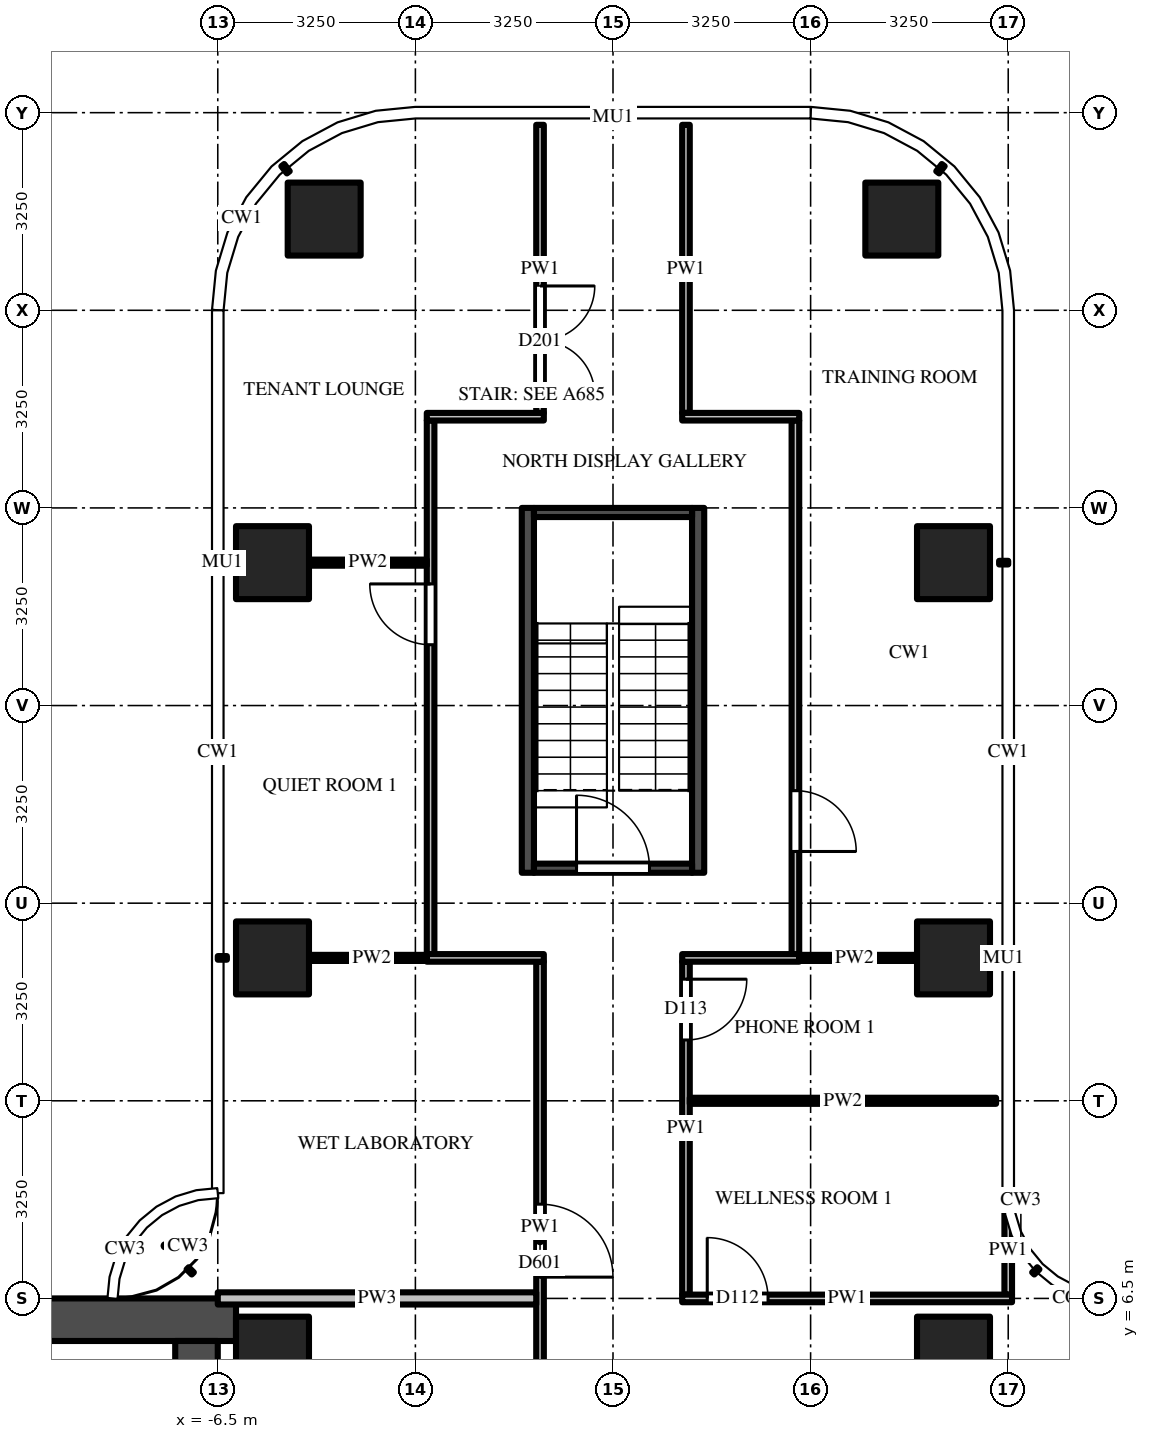
"""IFC4 building model, lengths in metres.
Left out: names, types, materials, properties, quantities, classifications, styles, units other than length and angle.
Written with IfcOpenShell. Run it as: python <this file> out.ifc"""

import sys

from ifc_helpers import new_model, si_unit, direction, frame, frame_2d, origin, origin_2d, place, context, subcontext, project, spatial, rectangle, extrude, source, transform, mapped, element, fill, save


model = new_model("IFC4")
c1 = context("Model", 3, precision=1e-05, world=origin(), true_north=direction((0.0, 1.0)))
c2 = subcontext(c1, "Body", "Model", "MODEL_VIEW")
j1 = project(units=[si_unit("LENGTHUNIT", "METRE"), si_unit("PLANEANGLEUNIT", "RADIAN")], contexts=[c1])
p1 = place(None, origin())
s1 = spatial("IfcSite", under=j1, at=p1, CompositionType="ELEMENT")
p2 = place(p1, origin())
s2 = spatial("IfcBuilding", under=s1, at=p2, CompositionType="ELEMENT")
p3 = place(p2, frame((0.0, 0.0, 177.6)))
s3 = spatial("IfcBuildingStorey", under=s2, at=p3, CompositionType="ELEMENT", Elevation=177.6)
m1 = source(origin(), c2, "Body", "SweptSolid", [
    extrude(rectangle(XDim=1.2, YDim=1.2, at=origin_2d()), origin(), (0.0, 0.0, 1.0), 3.9),
])
for number, where, z_axis, x_axis in (
    (1, (-5.6, 12.1, 0.0), (0.0, 0.0, 1.0), (1.0, 0.0, 0.0)),
    (2, (-5.6, 18.6, 0.0), (0.0, 0.0, 1.0), (1.0, 0.0, 0.0)),
    (3, (-4.75, 24.25, 0.0), (0.0, 0.0, 1.0), (1.0, 0.0, 0.0)),
    (4, (5.6, 12.1, 0.0), (0.0, 0.0, 1.0), (1.0, 0.0, 0.0)),
    (5, (5.6, 18.6, 0.0), (0.0, 0.0, 1.0), (1.0, 0.0, 0.0)),
    (6, (4.75, 24.25, 0.0), (0.0, 0.0, 1.0), (1.0, 0.0, 0.0)),
    (7, (5.6, 5.6, 0.0), (0.0, 0.0, 1.0), (1.0, 0.0, 0.0)),
    (8, (-5.6, 5.6, 0.0), (0.0, 0.0, 1.0), (1.0, 0.0, 0.0)),
):
    element("IfcColumn", number, at=place(p3, frame(where, z_axis=z_axis, x_axis=x_axis)), inside=s3, PredefinedType="COLUMN", context=c2, shape_type="MappedRepresentation", body=[
        mapped(m1, transform((0.0, 0.0, 0.0))),
    ])
m2 = source(origin(), c2, "Body", "SweptSolid", [
    extrude(rectangle(XDim=16.55, YDim=0.7, at=frame_2d((8.275, 0.0))), origin(), (0.0, 0.0, 1.0), 3.7),
])
p4 = place(p3, frame((-6.2, 6.15, 0.0), z_axis=(0.0, 0.0, 1.0), x_axis=(-1.0, 0.0, 0.0)))
e9 = element("IfcWall", 9, at=p4, inside=s3, PredefinedType="SHEAR", context=c2, shape_type="MappedRepresentation", body=[
    mapped(m2, transform((0.0, 0.0, 0.0))),
])
m3 = source(origin(), c2, "Body", "SweptSolid", [
    extrude(rectangle(XDim=9.05, YDim=0.7, at=frame_2d((4.525, 0.0))), origin(), (0.0, 0.0, 1.0), 3.7),
])
p5 = place(p3, frame((-6.85, 5.8, 0.0), z_axis=(0.0, 0.0, 1.0), x_axis=(0.0, -1.0, 0.0)))
e10 = element("IfcWall", 10, at=p5, inside=s3, PredefinedType="SHEAR", context=c2, shape_type="MappedRepresentation", body=[
    mapped(m3, transform((0.0, 0.0, 0.0))),
])
m4 = source(origin(), c2, "Body", "SweptSolid", [
    extrude(rectangle(XDim=1.8, YDim=2.1, at=frame_2d((0.9, 1.05))), frame((0.0, 0.36, 0.0), z_axis=(0.0, -1.0, 0.0), x_axis=(1.0, 0.0, 0.0)), (0.0, 0.0, 1.0), 0.72),
])
p6 = place(p5, frame((3.15, 0.0, 0.0)))
e11 = element("IfcOpeningElement", 11, at=p6, cuts=e10, PredefinedType="OPENING", context=c2, shape_type="MappedRepresentation", body=[
    mapped(m4, transform((0.0, 0.0, 0.0))),
])
m5 = source(origin(), c2, "Body", "SweptSolid", [
    extrude(rectangle(XDim=6.0, YDim=0.2, at=frame_2d((3.0, 0.0))), origin(), (0.0, 0.0, 1.0), 3.7),
])
for number, where, z_axis, x_axis in (
    (12, (-1.4, 13.5, 0.0), (0.0, 0.0, 1.0), (0.0, 1.0, 0.0)),
    (13, (1.4, 13.5, 0.0), (0.0, 0.0, 1.0), (0.0, 1.0, 0.0)),
):
    element("IfcWall", number, at=place(p3, frame(where, z_axis=z_axis, x_axis=x_axis)), inside=s3, PredefinedType="SHEAR", context=c2, shape_type="MappedRepresentation", body=[
        mapped(m5, transform((0.0, 0.0, 0.0))),
    ])
m6 = source(origin(), c2, "Body", "SweptSolid", [
    extrude(rectangle(XDim=2.6, YDim=0.15, at=frame_2d((1.3, 0.0))), origin(), (0.0, 0.0, 1.0), 3.7),
])
p7 = place(p3, frame((-1.3, 13.575, 0.0), z_axis=(0.0, 0.0, 1.0), x_axis=(1.0, 0.0, 0.0)))
e14 = element("IfcWall", 14, at=p7, inside=s3, PredefinedType="SHEAR", context=c2, shape_type="MappedRepresentation", body=[
    mapped(m6, transform((0.0, 0.0, 0.0))),
])
m7 = source(origin(), c2, "Body", "SweptSolid", [
    extrude(rectangle(XDim=1.2, YDim=2.1, at=frame_2d((0.6, 1.05))), frame((0.0, 0.085, 0.0), z_axis=(0.0, -1.0, 0.0), x_axis=(1.0, 0.0, 0.0)), (0.0, 0.0, 1.0), 0.17),
])
p8 = place(p7, frame((0.7, 0.0, 0.0)))
e15 = element("IfcOpeningElement", 15, at=p8, cuts=e14, PredefinedType="OPENING", context=c2, shape_type="MappedRepresentation", body=[
    mapped(m7, transform((0.0, 0.0, 0.0))),
])
p9 = place(p3, frame((-1.3, 19.425, 0.0), z_axis=(0.0, 0.0, 1.0), x_axis=(1.0, 0.0, 0.0)))
e16 = element("IfcWall", 16, at=p9, inside=s3, PredefinedType="SHEAR", context=c2, shape_type="MappedRepresentation", body=[
    mapped(m6, transform((0.0, 0.0, 0.0))),
])
m8 = source(origin(), c2, "Body", "SweptSolid", [
    extrude(rectangle(XDim=8.788, YDim=0.125, at=frame_2d((4.394, 0.0))), origin(), (0.0, 0.0, 1.0), 2.997),
])
p10 = place(p3, frame((-3.0, 12.15, 0.0), z_axis=(0.0, 0.0, 1.0), x_axis=(0.0, 1.0, 0.0)))
e17 = element("IfcWall", 17, at=p10, inside=s3, PredefinedType="PARTITIONING", context=c2, shape_type="MappedRepresentation", body=[
    mapped(m8, transform((0.0, 0.0, 0.0))),
])
m9 = source(origin(), c2, "Body", "SweptSolid", [
    extrude(rectangle(XDim=1.0, YDim=2.1, at=frame_2d((0.5, 1.05))), frame((0.0, 0.073, 0.0), z_axis=(0.0, -1.0, 0.0), x_axis=(1.0, 0.0, 0.0)), (0.0, 0.0, 1.0), 0.145),
])
p11 = place(p10, frame((5.1, 0.0, 0.0)))
e18 = element("IfcOpeningElement", 18, at=p11, cuts=e17, PredefinedType="OPENING", context=c2, shape_type="MappedRepresentation", body=[
    mapped(m9, transform((0.0, 0.0, 0.0))),
])
m10 = source(origin(), c2, "Body", "SweptSolid", [
    extrude(rectangle(XDim=8.725, YDim=0.125, at=frame_2d((4.363, 0.0))), origin(), (0.0, 0.0, 1.0), 2.997),
])
p12 = place(p3, frame((-1.2, 12.038, 0.0), z_axis=(0.0, 0.0, 1.0), x_axis=(0.0, -1.0, 0.0)))
e19 = element("IfcWall", 19, at=p12, inside=s3, PredefinedType="PARTITIONING", context=c2, shape_type="MappedRepresentation", body=[
    mapped(m10, transform((0.0, 0.0, 0.0))),
])
m11 = source(origin(), c2, "Body", "SweptSolid", [
    extrude(rectangle(XDim=1.2, YDim=2.1, at=frame_2d((0.6, 1.05))), frame((0.0, 0.073, 0.0), z_axis=(0.0, -1.0, 0.0), x_axis=(1.0, 0.0, 0.0)), (0.0, 0.0, 1.0), 0.145),
])
p13 = place(p12, frame((3.988, 0.0, 0.0)))
e20 = element("IfcOpeningElement", 20, at=p13, cuts=e19, PredefinedType="OPENING", context=c2, shape_type="MappedRepresentation", body=[
    mapped(m11, transform((0.0, 0.0, 0.0))),
])
m12 = source(origin(), c2, "Body", "SweptSolid", [
    extrude(rectangle(XDim=4.738, YDim=0.125, at=frame_2d((2.369, 0.0))), origin(), (0.0, 0.0, 1.0), 2.78),
])
p14 = place(p3, frame((-1.2, 25.8, 0.0), z_axis=(0.0, 0.0, 1.0), x_axis=(0.0, -1.0, 0.0)))
e21 = element("IfcWall", 21, at=p14, inside=s3, PredefinedType="PARTITIONING", context=c2, shape_type="MappedRepresentation", body=[
    mapped(m12, transform((0.0, 0.0, 0.0))),
])
m13 = source(origin(), c2, "Body", "SweptSolid", [
    extrude(rectangle(XDim=1.8, YDim=2.1, at=frame_2d((0.9, 1.05))), frame((0.0, 0.073, 0.0), z_axis=(0.0, -1.0, 0.0), x_axis=(1.0, 0.0, 0.0)), (0.0, 0.0, 1.0), 0.145),
])
p15 = place(p14, frame((2.65, 0.0, 0.0)))
e22 = element("IfcOpeningElement", 22, at=p15, cuts=e21, PredefinedType="OPENING", context=c2, shape_type="MappedRepresentation", body=[
    mapped(m13, transform((0.0, 0.0, 0.0))),
])
m14 = source(origin(), c2, "Body", "SweptSolid", [
    extrude(rectangle(XDim=5.475, YDim=0.125, at=frame_2d((2.738, 0.0))), origin(), (0.0, 0.0, 1.0), 2.997),
])
p16 = place(p3, frame((1.2, 12.038, 0.0), z_axis=(0.0, 0.0, 1.0), x_axis=(0.0, -1.0, 0.0)))
e23 = element("IfcWall", 23, at=p16, inside=s3, PredefinedType="PARTITIONING", context=c2, shape_type="MappedRepresentation", body=[
    mapped(m14, transform((0.0, 0.0, 0.0))),
])
p17 = place(p16, frame((0.288, 0.0, 0.0)))
e24 = element("IfcOpeningElement", 24, at=p17, cuts=e23, PredefinedType="OPENING", context=c2, shape_type="MappedRepresentation", body=[
    mapped(m9, transform((0.0, 0.0, 0.0))),
])
p18 = place(p3, frame((1.2, 25.8, 0.0), z_axis=(0.0, 0.0, 1.0), x_axis=(0.0, -1.0, 0.0)))
e25 = element("IfcWall", 25, at=p18, inside=s3, PredefinedType="PARTITIONING", context=c2, shape_type="MappedRepresentation", body=[
    mapped(m12, transform((0.0, 0.0, 0.0))),
])
p19 = place(p3, frame((3.0, 20.938, 0.0), z_axis=(0.0, 0.0, 1.0), x_axis=(0.0, -1.0, 0.0)))
e26 = element("IfcWall", 26, at=p19, inside=s3, PredefinedType="PARTITIONING", context=c2, shape_type="MappedRepresentation", body=[
    mapped(m8, transform((0.0, 0.0, 0.0))),
])
p20 = place(p19, frame((6.087, 0.0, 0.0)))
e27 = element("IfcOpeningElement", 27, at=p20, cuts=e26, PredefinedType="OPENING", context=c2, shape_type="MappedRepresentation", body=[
    mapped(m9, transform((0.0, 0.0, 0.0))),
])
m15 = source(origin(), c2, "Body", "SweptSolid", [
    extrude(rectangle(XDim=1.469, YDim=0.125, at=frame_2d((0.734, 0.0))), origin(), (0.0, 0.0, 1.0), 3.7),
])
p21 = place(p3, frame((6.5, 6.562, 0.0), z_axis=(0.0, 0.0, 1.0), x_axis=(0.0, 1.0, 0.0)))
e28 = element("IfcWall", 28, at=p21, inside=s3, PredefinedType="PARTITIONING", context=c2, shape_type="MappedRepresentation", body=[
    mapped(m15, transform((0.0, 0.0, 0.0))),
])
m16 = source(origin(), c2, "Body", "SweptSolid", [
    extrude(rectangle(XDim=5.238, YDim=0.2, at=frame_2d((2.619, 0.0))), origin(), (0.0, 0.0, 1.0), 2.78),
])
p22 = place(p3, frame((-6.5, 6.5, 0.0), z_axis=(0.0, 0.0, 1.0), x_axis=(1.0, 0.0, 0.0)))
e29 = element("IfcWall", 29, at=p22, inside=s3, PredefinedType="PARTITIONING", context=c2, shape_type="MappedRepresentation", body=[
    mapped(m16, transform((0.0, 0.0, 0.0))),
])
m17 = source(origin(), c2, "Body", "SweptSolid", [
    extrude(rectangle(XDim=5.425, YDim=0.125, at=frame_2d((2.712, 0.0))), origin(), (0.0, 0.0, 1.0), 2.78),
])
p23 = place(p3, frame((1.137, 6.5, 0.0), z_axis=(0.0, 0.0, 1.0), x_axis=(1.0, 0.0, 0.0)))
e30 = element("IfcWall", 30, at=p23, inside=s3, PredefinedType="PARTITIONING", context=c2, shape_type="MappedRepresentation", body=[
    mapped(m17, transform((0.0, 0.0, 0.0))),
])
p24 = place(p23, frame((0.413, 0.0, 0.0)))
e31 = element("IfcOpeningElement", 31, at=p24, cuts=e30, PredefinedType="OPENING", context=c2, shape_type="MappedRepresentation", body=[
    mapped(m9, transform((0.0, 0.0, 0.0))),
])
m18 = source(origin(), c2, "Body", "SweptSolid", [
    extrude(rectangle(XDim=5.038, YDim=0.1, at=frame_2d((2.519, 0.0))), origin(), (0.0, 0.0, 1.0), 2.78),
])
p25 = place(p3, frame((1.262, 9.75, 0.0), z_axis=(0.0, 0.0, 1.0), x_axis=(1.0, 0.0, 0.0)))
e32 = element("IfcWall", 32, at=p25, inside=s3, PredefinedType="PARTITIONING", context=c2, shape_type="MappedRepresentation", body=[
    mapped(m18, transform((0.0, 0.0, 0.0))),
])
m19 = source(origin(), c2, "Body", "SweptSolid", [
    extrude(rectangle(XDim=2.062, YDim=0.1, at=frame_2d((1.031, 0.0))), origin(), (0.0, 0.0, 1.0), 2.997),
])
for number, where, z_axis, x_axis in (
    (33, (-5.0, 12.1, 0.0), (0.0, 0.0, 1.0), (1.0, 0.0, 0.0)),
    (34, (2.938, 12.1, 0.0), (0.0, 0.0, 1.0), (1.0, 0.0, 0.0)),
):
    element("IfcWall", number, at=place(p3, frame(where, z_axis=z_axis, x_axis=x_axis)), inside=s3, PredefinedType="PARTITIONING", context=c2, shape_type="MappedRepresentation", body=[
        mapped(m19, transform((0.0, 0.0, 0.0))),
    ])
m20 = source(origin(), c2, "Body", "SweptSolid", [
    extrude(rectangle(XDim=1.925, YDim=0.125, at=frame_2d((0.962, 0.0))), origin(), (0.0, 0.0, 1.0), 2.997),
])
for number, where, z_axis, x_axis in (
    (35, (-1.137, 12.1, 0.0), (0.0, 0.0, 1.0), (-1.0, 0.0, 0.0)),
    (36, (3.062, 12.1, 0.0), (0.0, 0.0, 1.0), (-1.0, 0.0, 0.0)),
):
    element("IfcWall", number, at=place(p3, frame(where, z_axis=z_axis, x_axis=x_axis)), inside=s3, PredefinedType="PARTITIONING", context=c2, shape_type="MappedRepresentation", body=[
        mapped(m20, transform((0.0, 0.0, 0.0))),
    ])
m21 = source(origin(), c2, "Body", "SweptSolid", [
    extrude(rectangle(XDim=1.938, YDim=0.1, at=frame_2d((0.969, 0.0))), origin(), (0.0, 0.0, 1.0), 3.223),
])
p26 = place(p3, frame((-5.0, 18.6, 0.0), z_axis=(0.0, 0.0, 1.0), x_axis=(1.0, 0.0, 0.0)))
e37 = element("IfcWall", 37, at=p26, inside=s3, PredefinedType="PARTITIONING", context=c2, shape_type="MappedRepresentation", body=[
    mapped(m21, transform((0.0, 0.0, 0.0))),
])
m22 = source(origin(), c2, "Body", "SweptSolid", [
    extrude(rectangle(XDim=1.925, YDim=0.125, at=frame_2d((0.962, 0.0))), origin(), (0.0, 0.0, 1.0), 3.7),
])
for number, where, z_axis, x_axis in (
    (38, (-3.062, 21.0, 0.0), (0.0, 0.0, 1.0), (1.0, 0.0, 0.0)),
    (39, (1.137, 21.0, 0.0), (0.0, 0.0, 1.0), (1.0, 0.0, 0.0)),
):
    element("IfcWall", number, at=place(p3, frame(where, z_axis=z_axis, x_axis=x_axis)), inside=s3, PredefinedType="PARTITIONING", context=c2, shape_type="MappedRepresentation", body=[
        mapped(m22, transform((0.0, 0.0, 0.0))),
    ])
m23 = source(origin(), c2, "Body", "SweptSolid", [
    extrude(rectangle(XDim=1.2, YDim=2.1, at=frame_2d((0.6, 1.05))), frame((0.0, 0.025, 0.0), z_axis=(0.0, -1.0, 0.0), x_axis=(1.0, 0.0, 0.0)), (0.0, 0.0, 1.0), 0.05),
])
p27 = place(p8, origin())
e40 = element("IfcDoor", 40, at=p27, inside=s3, OperationType="SINGLE_SWING_LEFT", PredefinedType="DOOR", context=c2, shape_type="MappedRepresentation", body=[
    mapped(m23, transform((0.0, 0.0, 0.0))),
])
fill(e15, e40)
m24 = source(origin(), c2, "Body", "SweptSolid", [
    extrude(rectangle(XDim=1.0, YDim=2.1, at=frame_2d((0.5, 1.05))), frame((0.0, 0.025, 0.0), z_axis=(0.0, -1.0, 0.0), x_axis=(1.0, 0.0, 0.0)), (0.0, 0.0, 1.0), 0.05),
])
p28 = place(p24, origin())
e41 = element("IfcDoor", 41, at=p28, inside=s3, OperationType="SINGLE_SWING_LEFT", PredefinedType="DOOR", context=c2, shape_type="MappedRepresentation", body=[
    mapped(m24, transform((0.0, 0.0, 0.0))),
])
fill(e31, e41)
p29 = place(p13, origin())
e42 = element("IfcDoor", 42, at=p29, inside=s3, OperationType="SINGLE_SWING_RIGHT", PredefinedType="DOOR", context=c2, shape_type="MappedRepresentation", body=[
    mapped(m23, transform((0.0, 0.0, 0.0))),
])
fill(e20, e42)
p30 = place(p17, origin())
e43 = element("IfcDoor", 43, at=p30, inside=s3, OperationType="SINGLE_SWING_LEFT", PredefinedType="DOOR", context=c2, shape_type="MappedRepresentation", body=[
    mapped(m24, transform((0.0, 0.0, 0.0))),
])
fill(e24, e43)
p31 = place(p20, origin())
e44 = element("IfcDoor", 44, at=p31, inside=s3, OperationType="SINGLE_SWING_RIGHT", PredefinedType="DOOR", context=c2, shape_type="MappedRepresentation", body=[
    mapped(m24, transform((0.0, 0.0, 0.0))),
])
fill(e27, e44)
p32 = place(p11, origin())
e45 = element("IfcDoor", 45, at=p32, inside=s3, OperationType="SINGLE_SWING_RIGHT", PredefinedType="DOOR", context=c2, shape_type="MappedRepresentation", body=[
    mapped(m24, transform((0.0, 0.0, 0.0))),
])
fill(e18, e45)
m25 = source(origin(), c2, "Body", "SweptSolid", [
    extrude(rectangle(XDim=1.8, YDim=2.1, at=frame_2d((0.9, 1.05))), frame((0.0, 0.025, 0.0), z_axis=(0.0, -1.0, 0.0), x_axis=(1.0, 0.0, 0.0)), (0.0, 0.0, 1.0), 0.05),
])
p33 = place(p15, origin())
e46 = element("IfcDoor", 46, at=p33, inside=s3, OperationType="DOUBLE_DOOR_SINGLE_SWING", PredefinedType="DOOR", context=c2, shape_type="MappedRepresentation", body=[
    mapped(m25, transform((0.0, 0.0, 0.0))),
])
fill(e22, e46)
save(model, sys.argv[1])
